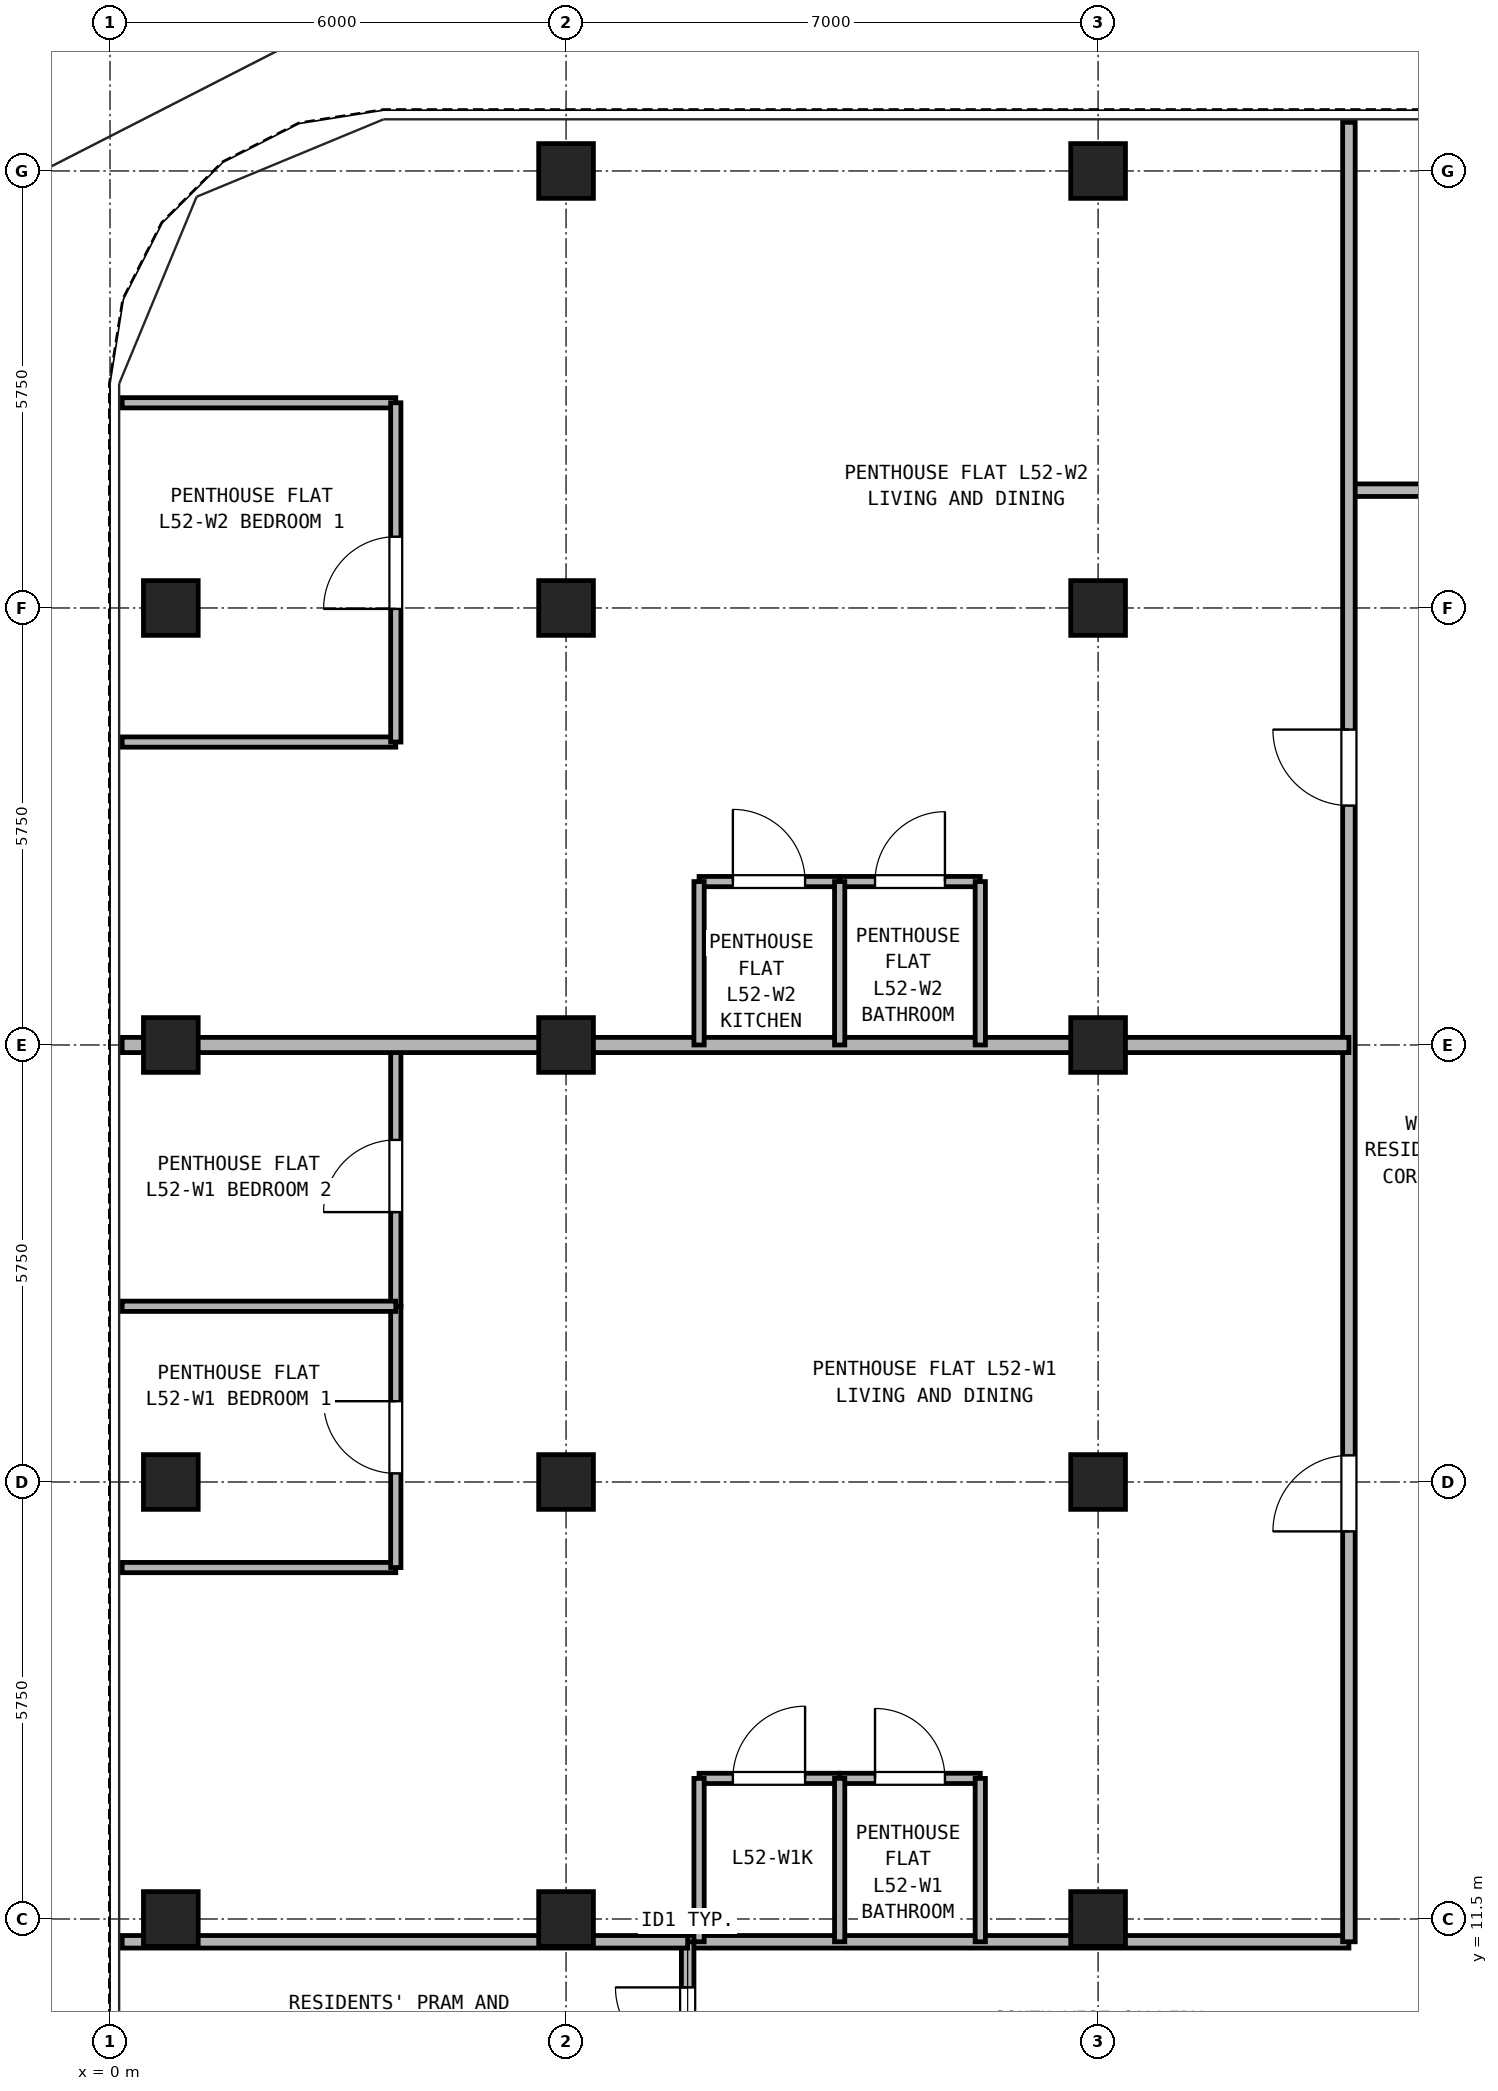
"""IFC4 building model, lengths in metres.
Left out: names, types, materials, properties, quantities, classifications, styles, units other than length and angle.
Written with IfcOpenShell. Run it as: python <this file> out.ifc"""

import sys

from ifc_helpers import new_model, si_unit, direction, frame, frame_2d, origin, origin_2d, place, context, subcontext, project, spatial, rectangle, hollow_rectangle, extrude, source, transform, mapped, element, fill, save


model = new_model("IFC4")
c1 = context("Model", 3, precision=1e-05, world=origin(), true_north=direction((0.0, 1.0)))
c2 = subcontext(c1, "Body", "Model", "MODEL_VIEW")
j1 = project(units=[si_unit("LENGTHUNIT", "METRE"), si_unit("PLANEANGLEUNIT", "RADIAN")], contexts=[c1])
p1 = place(None, origin())
s1 = spatial("IfcSite", under=j1, at=p1, CompositionType="ELEMENT")
p2 = place(p1, origin())
s2 = spatial("IfcBuilding", under=s1, at=p2, CompositionType="ELEMENT")
p3 = place(p2, frame((0.0, 0.0, 184.9)))
s3 = spatial("IfcBuildingStorey", under=s2, at=p3, CompositionType="ELEMENT", Elevation=184.9)
m1 = source(origin(), c2, "Body", "SweptSolid", [
    extrude(hollow_rectangle(XDim=0.72, YDim=0.72, WallThickness=0.04, at=origin_2d()), origin(), (0.0, 0.0, 1.0), 2.84),
])
for number, where, z_axis, x_axis in (
    (1, (6.0, 34.5, 0.0), (0.0, 0.0, 1.0), (1.0, 0.0, 0.0)),
    (2, (13.0, 34.5, 0.0), (0.0, 0.0, 1.0), (1.0, 0.0, 0.0)),
    (3, (0.8, 11.5, 0.0), (0.0, 0.0, 1.0), (1.0, 0.0, 0.0)),
    (4, (0.8, 17.25, 0.0), (0.0, 0.0, 1.0), (1.0, 0.0, 0.0)),
    (5, (0.8, 23.0, 0.0), (0.0, 0.0, 1.0), (1.0, 0.0, 0.0)),
    (6, (0.8, 28.75, 0.0), (0.0, 0.0, 1.0), (1.0, 0.0, 0.0)),
    (7, (6.0, 11.5, 0.0), (0.0, 0.0, 1.0), (1.0, 0.0, 0.0)),
    (8, (6.0, 17.25, 0.0), (0.0, 0.0, 1.0), (1.0, 0.0, 0.0)),
    (9, (6.0, 23.0, 0.0), (0.0, 0.0, 1.0), (1.0, 0.0, 0.0)),
    (10, (6.0, 28.75, 0.0), (0.0, 0.0, 1.0), (1.0, 0.0, 0.0)),
    (11, (13.0, 11.5, 0.0), (0.0, 0.0, 1.0), (1.0, 0.0, 0.0)),
    (12, (13.0, 17.25, 0.0), (0.0, 0.0, 1.0), (1.0, 0.0, 0.0)),
    (13, (13.0, 23.0, 0.0), (0.0, 0.0, 1.0), (1.0, 0.0, 0.0)),
    (14, (13.0, 28.75, 0.0), (0.0, 0.0, 1.0), (1.0, 0.0, 0.0)),
):
    element("IfcColumn", number, at=place(p3, frame(where, z_axis=z_axis, x_axis=x_axis)), inside=s3, PredefinedType="COLUMN", context=c2, shape_type="MappedRepresentation", body=[
        mapped(m1, transform((0.0, 0.0, 0.0), x_axis=(1.0, 0.0, 0.0), y_axis=(0.0, 1.0, 0.0), z_axis=(0.0, 0.0, 1.0), scale=1.0)),
    ])
p4 = place(p3, frame((7.6, 11.2, 0.0), z_axis=(0.0, 0.0, 1.0), x_axis=(1.0, 0.0, 0.0)))
e15 = element("IfcWall", 15, at=p4, inside=s3, PredefinedType="PARTITIONING", context=c2, shape_type="SweptSolid", body=[
    extrude(rectangle(XDim=8.7, YDim=0.165, at=frame_2d((4.35, 0.0))), origin(), (0.0, 0.0, 1.0), 2.84),
])
p5 = place(p3, frame((7.6, 9.2, 0.0), z_axis=(0.0, 0.0, 1.0), x_axis=(0.0, 1.0, 0.0)))
e16 = element("IfcWall", 16, at=p5, inside=s3, PredefinedType="PARTITIONING", context=c2, shape_type="SweptSolid", body=[
    extrude(rectangle(XDim=2.0, YDim=0.165, at=frame_2d((1.0, 0.0))), origin(), (0.0, 0.0, 1.0), 2.84),
])
p6 = place(p5, frame((0.45, 0.0, 0.0)))
e17 = element("IfcOpeningElement", 17, at=p6, cuts=e16, PredefinedType="OPENING", context=c2, shape_type="SweptSolid", body=[
    extrude(rectangle(XDim=0.95, YDim=2.15, at=frame_2d((0.475, 1.075))), frame((0.0, 0.093, 0.0), z_axis=(0.0, -1.0, 0.0), x_axis=(1.0, 0.0, 0.0)), (0.0, 0.0, 1.0), 0.185),
])
p7 = place(p3, frame((16.3, 30.3, 0.0), z_axis=(0.0, 0.0, 1.0), x_axis=(1.0, 0.0, 0.0)))
e18 = element("IfcWall", 18, at=p7, inside=s3, PredefinedType="PARTITIONING", context=c2, shape_type="SweptSolid", body=[
    extrude(rectangle(XDim=14.4, YDim=0.165, at=frame_2d((7.2, 0.0))), origin(), (0.0, 0.0, 1.0), 2.84),
])
p8 = place(p7, frame((3.1, 0.0, 0.0)))
e19 = element("IfcOpeningElement", 19, at=p8, cuts=e18, PredefinedType="OPENING", context=c2, shape_type="SweptSolid", body=[
    extrude(rectangle(XDim=0.95, YDim=2.15, at=frame_2d((0.475, 1.075))), frame((0.0, 0.093, 0.0), z_axis=(0.0, -1.0, 0.0), x_axis=(1.0, 0.0, 0.0)), (0.0, 0.0, 1.0), 0.185),
])
p9 = place(p7, frame((8.0, 0.0, 0.0)))
e20 = element("IfcOpeningElement", 20, at=p9, cuts=e18, PredefinedType="OPENING", context=c2, shape_type="SweptSolid", body=[
    extrude(rectangle(XDim=0.95, YDim=2.15, at=frame_2d((0.475, 1.075))), frame((0.0, 0.093, 0.0), z_axis=(0.0, -1.0, 0.0), x_axis=(1.0, 0.0, 0.0)), (0.0, 0.0, 1.0), 0.185),
])
p10 = place(p7, frame((10.8, 0.0, 0.0)))
e21 = element("IfcOpeningElement", 21, at=p10, cuts=e18, PredefinedType="OPENING", context=c2, shape_type="SweptSolid", body=[
    extrude(rectangle(XDim=0.92, YDim=2.1, at=frame_2d((0.46, 1.05))), frame((0.0, 0.093, 0.0), z_axis=(0.0, -1.0, 0.0), x_axis=(1.0, 0.0, 0.0)), (0.0, 0.0, 1.0), 0.185),
])
p11 = place(p3, frame((16.3, 11.2, 0.0), z_axis=(0.0, 0.0, 1.0), x_axis=(0.0, 1.0, 0.0)))
e22 = element("IfcWall", 22, at=p11, inside=s3, PredefinedType="PARTITIONING", context=c2, shape_type="SweptSolid", body=[
    extrude(rectangle(XDim=23.94, YDim=0.165, at=frame_2d((11.97, 0.0))), origin(), (0.0, 0.0, 1.0), 2.84),
])
p12 = place(p11, frame((5.4, 0.0, 0.0)))
e23 = element("IfcOpeningElement", 23, at=p12, cuts=e22, PredefinedType="OPENING", context=c2, shape_type="SweptSolid", body=[
    extrude(rectangle(XDim=1.0, YDim=2.15, at=frame_2d((0.5, 1.075))), frame((0.0, 0.093, 0.0), z_axis=(0.0, -1.0, 0.0), x_axis=(1.0, 0.0, 0.0)), (0.0, 0.0, 1.0), 0.185),
])
p13 = place(p11, frame((14.95, 0.0, 0.0)))
e24 = element("IfcOpeningElement", 24, at=p13, cuts=e22, PredefinedType="OPENING", context=c2, shape_type="SweptSolid", body=[
    extrude(rectangle(XDim=1.0, YDim=2.15, at=frame_2d((0.5, 1.075))), frame((0.0, 0.093, 0.0), z_axis=(0.0, -1.0, 0.0), x_axis=(1.0, 0.0, 0.0)), (0.0, 0.0, 1.0), 0.185),
])
p14 = place(p3, frame((0.16, 11.2, 0.0), z_axis=(0.0, 0.0, 1.0), x_axis=(1.0, 0.0, 0.0)))
e25 = element("IfcWall", 25, at=p14, inside=s3, PredefinedType="PARTITIONING", context=c2, shape_type="SweptSolid", body=[
    extrude(rectangle(XDim=7.44, YDim=0.165, at=frame_2d((3.72, 0.0))), origin(), (0.0, 0.0, 1.0), 2.84),
])
p15 = place(p3, frame((7.75, 13.35, 0.0), z_axis=(0.0, 0.0, 1.0), x_axis=(1.0, 0.0, 0.0)))
e26 = element("IfcWall", 26, at=p15, inside=s3, PredefinedType="PARTITIONING", context=c2, shape_type="SweptSolid", body=[
    extrude(rectangle(XDim=1.85, YDim=0.135, at=frame_2d((0.925, 0.0))), origin(), (0.0, 0.0, 1.0), 2.84),
])
p16 = place(p15, frame((0.445, 0.0, 0.0)))
e27 = element("IfcOpeningElement", 27, at=p16, cuts=e26, PredefinedType="OPENING", context=c2, shape_type="SweptSolid", body=[
    extrude(rectangle(XDim=0.95, YDim=2.15, at=frame_2d((0.475, 1.075))), frame((0.0, 0.077, 0.0), z_axis=(0.0, -1.0, 0.0), x_axis=(1.0, 0.0, 0.0)), (0.0, 0.0, 1.0), 0.155),
])
p17 = place(p3, frame((9.6, 13.35, 0.0), z_axis=(0.0, 0.0, 1.0), x_axis=(1.0, 0.0, 0.0)))
e28 = element("IfcWall", 28, at=p17, inside=s3, PredefinedType="PARTITIONING", context=c2, shape_type="SweptSolid", body=[
    extrude(rectangle(XDim=1.85, YDim=0.135, at=frame_2d((0.925, 0.0))), origin(), (0.0, 0.0, 1.0), 2.84),
])
p18 = place(p17, frame((0.465, 0.0, 0.0)))
e29 = element("IfcOpeningElement", 29, at=p18, cuts=e28, PredefinedType="OPENING", context=c2, shape_type="SweptSolid", body=[
    extrude(rectangle(XDim=0.92, YDim=2.1, at=frame_2d((0.46, 1.05))), frame((0.0, 0.077, 0.0), z_axis=(0.0, -1.0, 0.0), x_axis=(1.0, 0.0, 0.0)), (0.0, 0.0, 1.0), 0.155),
])
for number, where, z_axis, x_axis in (
    (30, (7.75, 11.2, 0.0), (0.0, 0.0, 1.0), (0.0, 1.0, 0.0)),
    (31, (9.6, 11.2, 0.0), (0.0, 0.0, 1.0), (0.0, 1.0, 0.0)),
    (32, (11.45, 11.2, 0.0), (0.0, 0.0, 1.0), (0.0, 1.0, 0.0)),
):
    element("IfcWall", number, at=place(p3, frame(where, z_axis=z_axis, x_axis=x_axis)), inside=s3, PredefinedType="PARTITIONING", context=c2, shape_type="SweptSolid", body=[
        extrude(rectangle(XDim=2.15, YDim=0.135, at=frame_2d((1.075, 0.0))), origin(), (0.0, 0.0, 1.0), 2.84),
    ])
p19 = place(p3, frame((0.16, 16.124, 0.0), z_axis=(0.0, 0.0, 1.0), x_axis=(1.0, 0.0, 0.0)))
e33 = element("IfcWall", 33, at=p19, inside=s3, PredefinedType="PARTITIONING", context=c2, shape_type="SweptSolid", body=[
    extrude(rectangle(XDim=3.6, YDim=0.135, at=frame_2d((1.8, 0.0))), origin(), (0.0, 0.0, 1.0), 2.84),
])
p20 = place(p3, frame((3.76, 16.124, 0.0), z_axis=(0.0, 0.0, 1.0), x_axis=(0.0, 1.0, 0.0)))
e34 = element("IfcWall", 34, at=p20, inside=s3, PredefinedType="PARTITIONING", context=c2, shape_type="SweptSolid", body=[
    extrude(rectangle(XDim=3.438, YDim=0.135, at=frame_2d((1.719, 0.0))), origin(), (0.0, 0.0, 1.0), 2.84),
])
p21 = place(p20, frame((1.239, 0.0, 0.0)))
e35 = element("IfcOpeningElement", 35, at=p21, cuts=e34, PredefinedType="OPENING", context=c2, shape_type="SweptSolid", body=[
    extrude(rectangle(XDim=0.95, YDim=2.15, at=frame_2d((0.475, 1.075))), frame((0.0, 0.077, 0.0), z_axis=(0.0, -1.0, 0.0), x_axis=(1.0, 0.0, 0.0)), (0.0, 0.0, 1.0), 0.155),
])
p22 = place(p3, frame((3.76, 19.562, 0.0), z_axis=(0.0, 0.0, 1.0), x_axis=(0.0, 1.0, 0.0)))
e36 = element("IfcWall", 36, at=p22, inside=s3, PredefinedType="PARTITIONING", context=c2, shape_type="SweptSolid", body=[
    extrude(rectangle(XDim=3.438, YDim=0.135, at=frame_2d((1.719, 0.0))), origin(), (0.0, 0.0, 1.0), 2.84),
])
p23 = place(p22, frame((1.239, 0.0, 0.0)))
e37 = element("IfcOpeningElement", 37, at=p23, cuts=e36, PredefinedType="OPENING", context=c2, shape_type="SweptSolid", body=[
    extrude(rectangle(XDim=0.95, YDim=2.15, at=frame_2d((0.475, 1.075))), frame((0.0, 0.077, 0.0), z_axis=(0.0, -1.0, 0.0), x_axis=(1.0, 0.0, 0.0)), (0.0, 0.0, 1.0), 0.155),
])
p24 = place(p3, frame((0.16, 19.562, 0.0), z_axis=(0.0, 0.0, 1.0), x_axis=(1.0, 0.0, 0.0)))
e38 = element("IfcWall", 38, at=p24, inside=s3, PredefinedType="PARTITIONING", context=c2, shape_type="SweptSolid", body=[
    extrude(rectangle(XDim=3.6, YDim=0.135, at=frame_2d((1.8, 0.0))), origin(), (0.0, 0.0, 1.0), 2.84),
])
p25 = place(p3, frame((0.16, 23.0, 0.0), z_axis=(0.0, 0.0, 1.0), x_axis=(1.0, 0.0, 0.0)))
e39 = element("IfcWall", 39, at=p25, inside=s3, PredefinedType="PARTITIONING", context=c2, shape_type="SweptSolid", body=[
    extrude(rectangle(XDim=16.14, YDim=0.2, at=frame_2d((8.07, 0.0))), origin(), (0.0, 0.0, 1.0), 2.213),
])
p26 = place(p3, frame((7.75, 25.15, 0.0), z_axis=(0.0, 0.0, 1.0), x_axis=(1.0, 0.0, 0.0)))
e40 = element("IfcWall", 40, at=p26, inside=s3, PredefinedType="PARTITIONING", context=c2, shape_type="SweptSolid", body=[
    extrude(rectangle(XDim=1.85, YDim=0.135, at=frame_2d((0.925, 0.0))), origin(), (0.0, 0.0, 1.0), 2.84),
])
p27 = place(p26, frame((0.445, 0.0, 0.0)))
e41 = element("IfcOpeningElement", 41, at=p27, cuts=e40, PredefinedType="OPENING", context=c2, shape_type="SweptSolid", body=[
    extrude(rectangle(XDim=0.95, YDim=2.15, at=frame_2d((0.475, 1.075))), frame((0.0, 0.077, 0.0), z_axis=(0.0, -1.0, 0.0), x_axis=(1.0, 0.0, 0.0)), (0.0, 0.0, 1.0), 0.155),
])
p28 = place(p3, frame((9.6, 25.15, 0.0), z_axis=(0.0, 0.0, 1.0), x_axis=(1.0, 0.0, 0.0)))
e42 = element("IfcWall", 42, at=p28, inside=s3, PredefinedType="PARTITIONING", context=c2, shape_type="SweptSolid", body=[
    extrude(rectangle(XDim=1.85, YDim=0.135, at=frame_2d((0.925, 0.0))), origin(), (0.0, 0.0, 1.0), 2.84),
])
p29 = place(p28, frame((0.465, 0.0, 0.0)))
e43 = element("IfcOpeningElement", 43, at=p29, cuts=e42, PredefinedType="OPENING", context=c2, shape_type="SweptSolid", body=[
    extrude(rectangle(XDim=0.92, YDim=2.1, at=frame_2d((0.46, 1.05))), frame((0.0, 0.077, 0.0), z_axis=(0.0, -1.0, 0.0), x_axis=(1.0, 0.0, 0.0)), (0.0, 0.0, 1.0), 0.155),
])
for number, where, z_axis, x_axis in (
    (44, (7.75, 23.0, 0.0), (0.0, 0.0, 1.0), (0.0, 1.0, 0.0)),
    (45, (9.6, 23.0, 0.0), (0.0, 0.0, 1.0), (0.0, 1.0, 0.0)),
    (46, (11.45, 23.0, 0.0), (0.0, 0.0, 1.0), (0.0, 1.0, 0.0)),
):
    element("IfcWall", number, at=place(p3, frame(where, z_axis=z_axis, x_axis=x_axis)), inside=s3, PredefinedType="PARTITIONING", context=c2, shape_type="SweptSolid", body=[
        extrude(rectangle(XDim=2.15, YDim=0.135, at=frame_2d((1.075, 0.0))), origin(), (0.0, 0.0, 1.0), 2.84),
    ])
for number, where, z_axis, x_axis in (
    (47, (0.16, 26.986, 0.0), (0.0, 0.0, 1.0), (1.0, 0.0, 0.0)),
    (48, (0.16, 31.45, 0.0), (0.0, 0.0, 1.0), (1.0, 0.0, 0.0)),
):
    element("IfcWall", number, at=place(p3, frame(where, z_axis=z_axis, x_axis=x_axis)), inside=s3, PredefinedType="PARTITIONING", context=c2, shape_type="SweptSolid", body=[
        extrude(rectangle(XDim=3.6, YDim=0.135, at=frame_2d((1.8, 0.0))), origin(), (0.0, 0.0, 1.0), 2.84),
    ])
p30 = place(p3, frame((3.76, 26.986, 0.0), z_axis=(0.0, 0.0, 1.0), x_axis=(0.0, 1.0, 0.0)))
e49 = element("IfcWall", 49, at=p30, inside=s3, PredefinedType="PARTITIONING", context=c2, shape_type="SweptSolid", body=[
    extrude(rectangle(XDim=4.464, YDim=0.135, at=frame_2d((2.232, 0.0))), origin(), (0.0, 0.0, 1.0), 2.84),
])
p31 = place(p30, frame((1.752, 0.0, 0.0)))
e50 = element("IfcOpeningElement", 50, at=p31, cuts=e49, PredefinedType="OPENING", context=c2, shape_type="SweptSolid", body=[
    extrude(rectangle(XDim=0.95, YDim=2.15, at=frame_2d((0.475, 1.075))), frame((0.0, 0.077, 0.0), z_axis=(0.0, -1.0, 0.0), x_axis=(1.0, 0.0, 0.0)), (0.0, 0.0, 1.0), 0.155),
])
p32 = place(p6, frame((0.95, 0.0, 0.0), z_axis=(0.0, 0.0, 1.0), x_axis=(-1.0, 0.0, 0.0)))
e51 = element("IfcDoor", 51, at=p32, inside=s3, OperationType="SINGLE_SWING_RIGHT", PredefinedType="DOOR", context=c2, shape_type="SweptSolid", body=[
    extrude(rectangle(XDim=0.95, YDim=2.15, at=frame_2d((0.475, 1.075))), frame((0.0, 0.025, 0.0), z_axis=(0.0, -1.0, 0.0), x_axis=(1.0, 0.0, 0.0)), (0.0, 0.0, 1.0), 0.05),
])
fill(e17, e51)
p33 = place(p16, origin())
e52 = element("IfcDoor", 52, at=p33, inside=s3, OperationType="SINGLE_SWING_RIGHT", PredefinedType="DOOR", context=c2, shape_type="SweptSolid", body=[
    extrude(rectangle(XDim=0.95, YDim=2.15, at=frame_2d((0.475, 1.075))), frame((0.0, 0.025, 0.0), z_axis=(0.0, -1.0, 0.0), x_axis=(1.0, 0.0, 0.0)), (0.0, 0.0, 1.0), 0.05),
])
fill(e27, e52)
p34 = place(p18, origin())
e53 = element("IfcDoor", 53, at=p34, inside=s3, OperationType="SINGLE_SWING_LEFT", PredefinedType="DOOR", context=c2, shape_type="SweptSolid", body=[
    extrude(rectangle(XDim=0.92, YDim=2.1, at=frame_2d((0.46, 1.05))), frame((0.0, 0.025, 0.0), z_axis=(0.0, -1.0, 0.0), x_axis=(1.0, 0.0, 0.0)), (0.0, 0.0, 1.0), 0.05),
])
fill(e29, e53)
p35 = place(p21, origin())
e54 = element("IfcDoor", 54, at=p35, inside=s3, OperationType="SINGLE_SWING_RIGHT", PredefinedType="DOOR", context=c2, shape_type="SweptSolid", body=[
    extrude(rectangle(XDim=0.95, YDim=2.15, at=frame_2d((0.475, 1.075))), frame((0.0, 0.025, 0.0), z_axis=(0.0, -1.0, 0.0), x_axis=(1.0, 0.0, 0.0)), (0.0, 0.0, 1.0), 0.05),
])
fill(e35, e54)
p36 = place(p23, origin())
e55 = element("IfcDoor", 55, at=p36, inside=s3, OperationType="SINGLE_SWING_LEFT", PredefinedType="DOOR", context=c2, shape_type="SweptSolid", body=[
    extrude(rectangle(XDim=0.95, YDim=2.15, at=frame_2d((0.475, 1.075))), frame((0.0, 0.025, 0.0), z_axis=(0.0, -1.0, 0.0), x_axis=(1.0, 0.0, 0.0)), (0.0, 0.0, 1.0), 0.05),
])
fill(e37, e55)
p37 = place(p12, origin())
e56 = element("IfcDoor", 56, at=p37, inside=s3, OperationType="SINGLE_SWING_LEFT", PredefinedType="DOOR", context=c2, shape_type="SweptSolid", body=[
    extrude(rectangle(XDim=1.0, YDim=2.15, at=frame_2d((0.5, 1.075))), frame((0.0, 0.025, 0.0), z_axis=(0.0, -1.0, 0.0), x_axis=(1.0, 0.0, 0.0)), (0.0, 0.0, 1.0), 0.05),
])
fill(e23, e56)
p38 = place(p27, origin())
e57 = element("IfcDoor", 57, at=p38, inside=s3, OperationType="SINGLE_SWING_LEFT", PredefinedType="DOOR", context=c2, shape_type="SweptSolid", body=[
    extrude(rectangle(XDim=0.95, YDim=2.15, at=frame_2d((0.475, 1.075))), frame((0.0, 0.025, 0.0), z_axis=(0.0, -1.0, 0.0), x_axis=(1.0, 0.0, 0.0)), (0.0, 0.0, 1.0), 0.05),
])
fill(e41, e57)
p39 = place(p29, origin())
e58 = element("IfcDoor", 58, at=p39, inside=s3, OperationType="SINGLE_SWING_RIGHT", PredefinedType="DOOR", context=c2, shape_type="SweptSolid", body=[
    extrude(rectangle(XDim=0.92, YDim=2.1, at=frame_2d((0.46, 1.05))), frame((0.0, 0.025, 0.0), z_axis=(0.0, -1.0, 0.0), x_axis=(1.0, 0.0, 0.0)), (0.0, 0.0, 1.0), 0.05),
])
fill(e43, e58)
p40 = place(p31, origin())
e59 = element("IfcDoor", 59, at=p40, inside=s3, OperationType="SINGLE_SWING_LEFT", PredefinedType="DOOR", context=c2, shape_type="SweptSolid", body=[
    extrude(rectangle(XDim=0.95, YDim=2.15, at=frame_2d((0.475, 1.075))), frame((0.0, 0.025, 0.0), z_axis=(0.0, -1.0, 0.0), x_axis=(1.0, 0.0, 0.0)), (0.0, 0.0, 1.0), 0.05),
])
fill(e50, e59)
p41 = place(p13, origin())
e60 = element("IfcDoor", 60, at=p41, inside=s3, OperationType="SINGLE_SWING_RIGHT", PredefinedType="DOOR", context=c2, shape_type="SweptSolid", body=[
    extrude(rectangle(XDim=1.0, YDim=2.15, at=frame_2d((0.5, 1.075))), frame((0.0, 0.025, 0.0), z_axis=(0.0, -1.0, 0.0), x_axis=(1.0, 0.0, 0.0)), (0.0, 0.0, 1.0), 0.05),
])
fill(e24, e60)
save(model, sys.argv[1])
